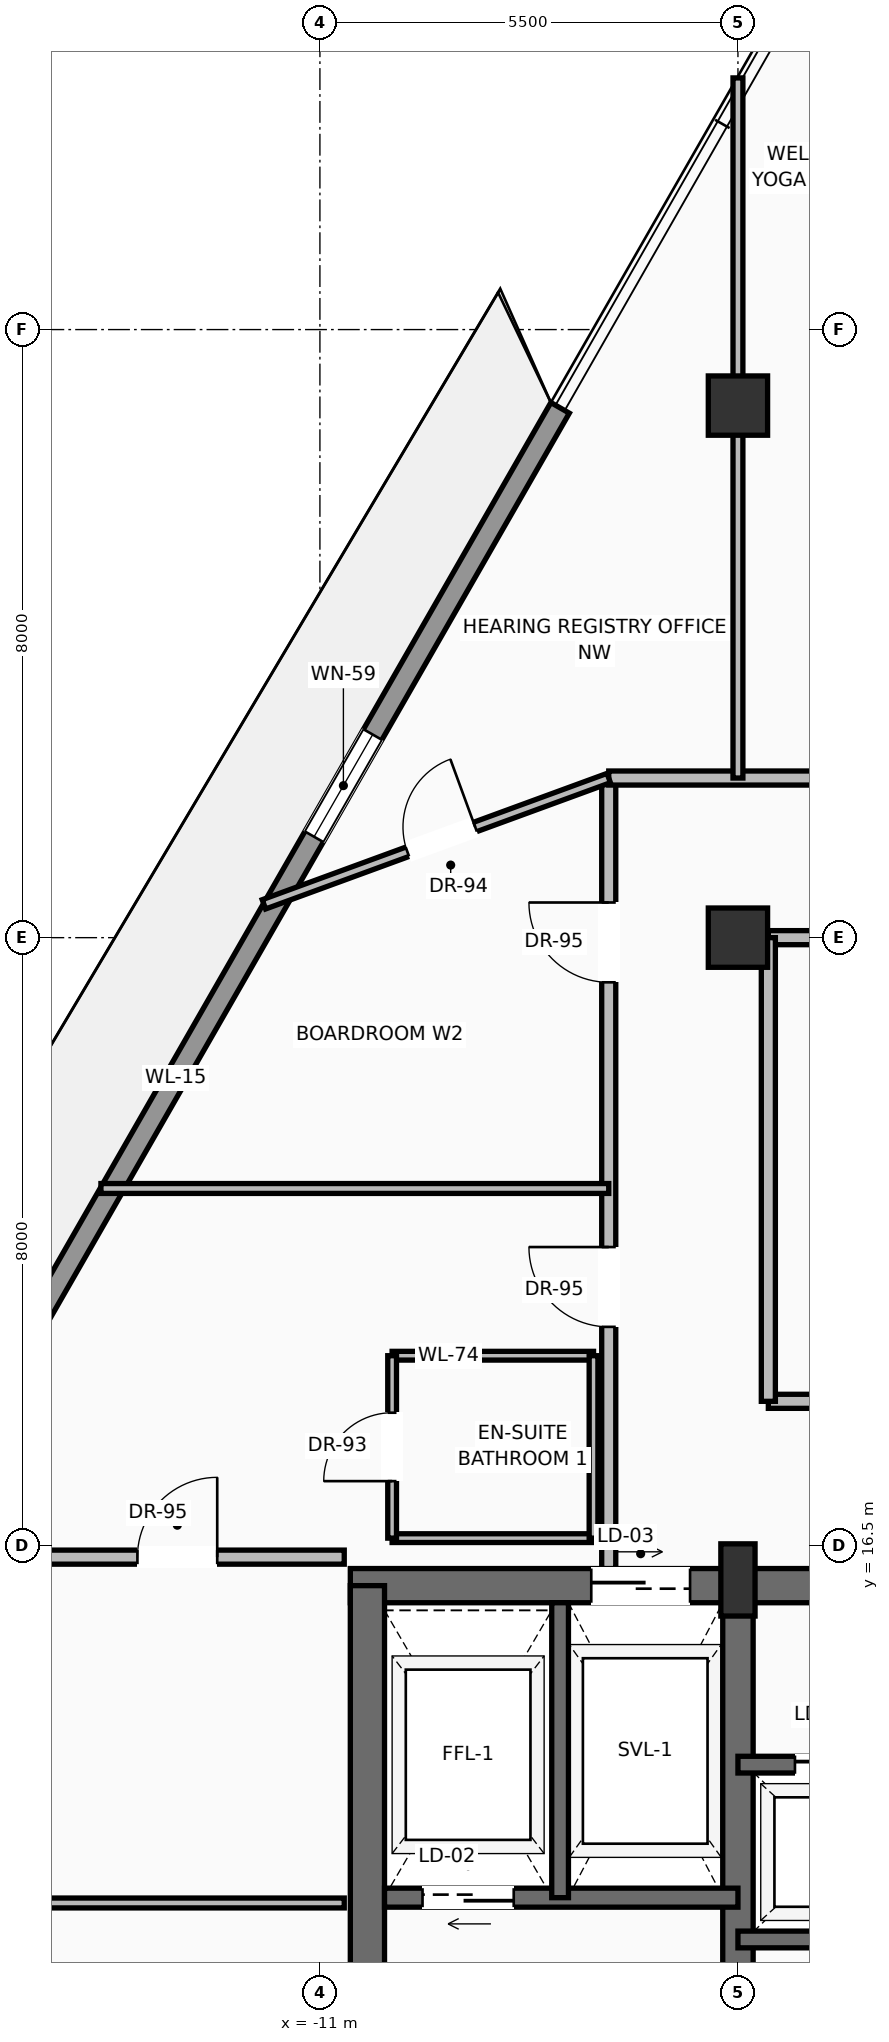
"""IFC4 building model, lengths in metres.
Left out: names, types, materials, properties, quantities, classifications, styles, units other than length and angle.
Written with IfcOpenShell. Run it as: python <this file> out.ifc"""

import sys

from ifc_helpers import new_model, si_unit, direction, frame, frame_2d, origin, origin_2d, place, context, subcontext, project, spatial, rectangle, extrude, source, transform, mapped, element, fill, save


model = new_model("IFC4")
c1 = context("Model", 3, precision=1e-05, world=origin(), true_north=direction((0.0, 1.0)))
c2 = subcontext(c1, "Body", "Model", "MODEL_VIEW")
j1 = project(units=[si_unit("LENGTHUNIT", "METRE"), si_unit("PLANEANGLEUNIT", "RADIAN")], contexts=[c1])
p1 = place(None, origin())
s1 = spatial("IfcSite", under=j1, at=p1, CompositionType="ELEMENT")
p2 = place(p1, origin())
s2 = spatial("IfcBuilding", under=s1, at=p2, CompositionType="ELEMENT")
p3 = place(p2, frame((0.0, 0.0, 293.7)))
s3 = spatial("IfcBuildingStorey", under=s2, at=p3, CompositionType="ELEMENT", Elevation=293.7)
p4 = place(p3, frame((-10.6, 15.975, 0.0), z_axis=(0.0, 0.0, 1.0), x_axis=(1.0, 0.0, 0.0)))
e1 = element("IfcWall", 1, at=p4, inside=s3, PredefinedType="SHEAR", context=c2, shape_type="SweptSolid", body=[
    extrude(rectangle(XDim=21.2, YDim=0.45, at=frame_2d((10.6, 0.0))), origin(), (0.0, 0.0, 1.0), 3.24),
])
p5 = place(p4, frame((3.17, 0.0, 0.0)))
e2 = element("IfcOpeningElement", 2, at=p5, cuts=e1, PredefinedType="OPENING", context=c2, shape_type="SweptSolid", body=[
    extrude(rectangle(XDim=1.3, YDim=2.3, at=frame_2d((0.65, 1.15))), frame((0.0, 0.235, 0.0), z_axis=(0.0, -1.0, 0.0), x_axis=(1.0, 0.0, 0.0)), (0.0, 0.0, 1.0), 0.47),
])
p6 = place(p4, frame((9.6, 0.0, 0.0)))
e3 = element("IfcOpeningElement", 3, at=p6, cuts=e1, PredefinedType="OPENING", context=c2, shape_type="SweptSolid", body=[
    extrude(rectangle(XDim=2.0, YDim=2.4, at=frame_2d((1.0, 1.2))), frame((0.0, 0.235, 0.0), z_axis=(0.0, -1.0, 0.0), x_axis=(1.0, 0.0, 0.0)), (0.0, 0.0, 1.0), 0.47),
])
p7 = place(p3, frame((-10.375, 0.625, 0.0), z_axis=(0.0, 0.0, 1.0), x_axis=(0.0, 1.0, 0.0)))
e4 = element("IfcWall", 4, at=p7, inside=s3, PredefinedType="SHEAR", context=c2, shape_type="SweptSolid", body=[
    extrude(rectangle(XDim=15.35, YDim=0.45, at=frame_2d((7.675, 0.0))), origin(), (0.0, 0.0, 1.0), 3.24),
])
p8 = place(p3, frame((-5.5, 0.625, 0.0), z_axis=(0.0, 0.0, 1.0), x_axis=(0.0, 1.0, 0.0)))
e5 = element("IfcWall", 5, at=p8, inside=s3, PredefinedType="SHEAR", context=c2, shape_type="SweptSolid", body=[
    extrude(rectangle(XDim=15.35, YDim=0.4, at=frame_2d((7.675, 0.0))), origin(), (0.0, 0.0, 1.0), 3.24),
])
p9 = place(p8, frame((8.875, 0.0, 0.0)))
e6 = element("IfcOpeningElement", 6, at=p9, cuts=e5, PredefinedType="OPENING", context=c2, shape_type="SweptSolid", body=[
    extrude(rectangle(XDim=1.1, YDim=2.2, at=frame_2d((0.55, 1.1))), frame((0.0, 0.21, 0.0), z_axis=(0.0, -1.0, 0.0), x_axis=(1.0, 0.0, 0.0)), (0.0, 0.0, 1.0), 0.42),
])
m1 = source(origin(), c2, "Body", "SweptSolid", [
    extrude(rectangle(XDim=0.45, YDim=0.95, at=origin_2d()), origin(), (0.0, 0.0, 1.0), 3.45),
])
p10 = place(p3, frame((-5.5, 16.05, 0.0), z_axis=(0.0, 0.0, 1.0), x_axis=(1.0, 0.0, 0.0)))
e7 = element("IfcColumn", 7, at=p10, inside=s3, PredefinedType="PILASTER", context=c2, shape_type="MappedRepresentation", body=[
    mapped(m1, transform((0.0, 0.0, 0.0), scale=1.0)),
])
m2 = source(origin(), c2, "Body", "SweptSolid", [
    extrude(rectangle(XDim=0.78, YDim=0.78, at=origin_2d()), origin(), (0.0, 0.0, 1.0), 3.45),
])
for number, where, z_axis, x_axis in (
    (8, (-5.5, 24.5, 0.0), (0.0, 0.0, 1.0), (1.0, 0.0, 0.0)),
    (9, (-5.5, 31.5, 0.0), (0.0, 0.0, 1.0), (1.0, 0.0, 0.0)),
):
    element("IfcColumn", number, at=place(p3, frame(where, z_axis=z_axis, x_axis=x_axis)), inside=s3, PredefinedType="COLUMN", context=c2, shape_type="MappedRepresentation", body=[
        mapped(m2, transform((0.0, 0.0, 0.0), scale=1.0)),
    ])
p11 = place(p3, frame((-17.955, 13.837, 0.0), z_axis=(0.0, 0.0, 1.0), x_axis=(0.49757006288, 0.867423790616, 0.0)))
e10 = element("IfcWall", 10, at=p11, inside=s3, PredefinedType="SOLIDWALL", context=c2, shape_type="SweptSolid", body=[
    extrude(rectangle(XDim=20.328, YDim=0.28, at=frame_2d((10.164, 0.0))), origin(), (0.0, 0.0, 1.0), 2.82),
])
p12 = place(p11, frame((4.879, 0.0, 0.0)))
e11 = element("IfcOpeningElement", 11, at=p12, cuts=e10, PredefinedType="OPENING", context=c2, shape_type="SweptSolid", body=[
    extrude(rectangle(XDim=1.6, YDim=2.35, at=frame_2d((0.8, 1.175))), frame((0.0, 0.15, 0.0), z_axis=(0.0, -1.0, 0.0), x_axis=(1.0, 0.0, 0.0)), (0.0, 0.0, 1.0), 0.3),
])
p13 = place(p11, frame((13.823, 0.0, 0.9)))
e12 = element("IfcOpeningElement", 12, at=p13, cuts=e10, PredefinedType="OPENING", context=c2, shape_type="SweptSolid", body=[
    extrude(rectangle(XDim=1.55, YDim=1.75, at=frame_2d((0.775, 0.875))), frame((0.0, 0.15, 0.0), z_axis=(0.0, -1.0, 0.0), x_axis=(1.0, 0.0, 0.0)), (0.0, 0.0, 1.0), 0.3),
])
p14 = place(p3, frame((-5.5, 11.87, 0.0), z_axis=(0.0, 0.0, 1.0), x_axis=(-1.0, 0.0, 0.0)))
e13 = element("IfcWall", 13, at=p14, inside=s3, PredefinedType="SOLIDWALL", context=c2, shape_type="SweptSolid", body=[
    extrude(rectangle(XDim=4.65, YDim=0.25, at=frame_2d((2.325, 0.0))), origin(), (0.0, 0.0, 1.0), 3.24),
])
p15 = place(p14, frame((2.95, 0.0, 0.0)))
e14 = element("IfcOpeningElement", 14, at=p15, cuts=e13, PredefinedType="OPENING", context=c2, shape_type="SweptSolid", body=[
    extrude(rectangle(XDim=1.2, YDim=2.25, at=frame_2d((0.6, 1.125))), frame((0.0, 0.135, 0.0), z_axis=(0.0, -1.0, 0.0), x_axis=(1.0, 0.0, 0.0)), (0.0, 0.0, 1.0), 0.27),
])
p16 = place(p3, frame((-7.84, 11.87, 0.0), z_axis=(0.0, 0.0, 1.0), x_axis=(0.0, 1.0, 0.0)))
e15 = element("IfcWall", 15, at=p16, inside=s3, PredefinedType="SOLIDWALL", context=c2, shape_type="SweptSolid", body=[
    extrude(rectangle(XDim=3.88, YDim=0.22, at=frame_2d((1.94, 0.0))), origin(), (0.0, 0.0, 1.0), 3.24),
])
p17 = place(p3, frame((-5.5, 11.32, 0.0), z_axis=(0.0, 0.0, 1.0), x_axis=(1.0, 0.0, 0.0)))
e16 = element("IfcWall", 16, at=p17, inside=s3, PredefinedType="SOLIDWALL", context=c2, shape_type="SweptSolid", body=[
    extrude(rectangle(XDim=7.32, YDim=0.22, at=frame_2d((3.66, 0.0))), origin(), (0.0, 0.0, 1.0), 3.24),
])
p18 = place(p3, frame((-5.5, 13.62, 0.0), z_axis=(0.0, 0.0, 1.0), x_axis=(1.0, 0.0, 0.0)))
e17 = element("IfcWall", 17, at=p18, inside=s3, PredefinedType="SOLIDWALL", context=c2, shape_type="SweptSolid", body=[
    extrude(rectangle(XDim=7.32, YDim=0.22, at=frame_2d((3.66, 0.0))), origin(), (0.0, 0.0, 1.0), 3.24),
])
p19 = place(p18, frame((0.75, 0.0, 0.0)))
e18 = element("IfcOpeningElement", 18, at=p19, cuts=e17, PredefinedType="OPENING", context=c2, shape_type="SweptSolid", body=[
    extrude(rectangle(XDim=1.1, YDim=2.2, at=frame_2d((0.55, 1.1))), frame((0.0, 0.12, 0.0), z_axis=(0.0, -1.0, 0.0), x_axis=(1.0, 0.0, 0.0)), (0.0, 0.0, 1.0), 0.24),
])
p20 = place(p18, frame((3.15, 0.0, 0.0)))
e19 = element("IfcOpeningElement", 19, at=p20, cuts=e17, PredefinedType="OPENING", context=c2, shape_type="SweptSolid", body=[
    extrude(rectangle(XDim=1.1, YDim=2.2, at=frame_2d((0.55, 1.1))), frame((0.0, 0.12, 0.0), z_axis=(0.0, -1.0, 0.0), x_axis=(1.0, 0.0, 0.0)), (0.0, 0.0, 1.0), 0.24),
])
p21 = place(p18, frame((5.55, 0.0, 0.0)))
e20 = element("IfcOpeningElement", 20, at=p21, cuts=e17, PredefinedType="OPENING", context=c2, shape_type="SweptSolid", body=[
    extrude(rectangle(XDim=1.1, YDim=2.2, at=frame_2d((0.55, 1.1))), frame((0.0, 0.12, 0.0), z_axis=(0.0, -1.0, 0.0), x_axis=(1.0, 0.0, 0.0)), (0.0, 0.0, 1.0), 0.24),
])
p22 = place(p3, frame((-5.1, 18.4, 0.0), z_axis=(0.0, 0.0, 1.0), x_axis=(1.0, 0.0, 0.0)))
e21 = element("IfcWall", 21, at=p22, inside=s3, PredefinedType="PARTITIONING", context=c2, shape_type="SweptSolid", body=[
    extrude(rectangle(XDim=10.2, YDim=0.185, at=frame_2d((5.1, 0.0))), origin(), (0.0, 0.0, 1.0), 3.232),
])
p23 = place(p22, frame((4.625, 0.0, 0.0)))
e22 = element("IfcOpeningElement", 22, at=p23, cuts=e21, PredefinedType="OPENING", context=c2, shape_type="SweptSolid", body=[
    extrude(rectangle(XDim=0.95, YDim=2.2, at=frame_2d((0.475, 1.1))), frame((0.0, 0.103, 0.0), z_axis=(0.0, -1.0, 0.0), x_axis=(1.0, 0.0, 0.0)), (0.0, 0.0, 1.0), 0.205),
])
p24 = place(p3, frame((-5.1, 24.5, 0.0), z_axis=(0.0, 0.0, 1.0), x_axis=(1.0, 0.0, 0.0)))
e23 = element("IfcWall", 23, at=p24, inside=s3, PredefinedType="PARTITIONING", context=c2, shape_type="SweptSolid", body=[
    extrude(rectangle(XDim=10.2, YDim=0.185, at=frame_2d((5.1, 0.0))), origin(), (0.0, 0.0, 1.0), 2.683),
])
p25 = place(p24, frame((4.625, 0.0, 0.0)))
e24 = element("IfcOpeningElement", 24, at=p25, cuts=e23, PredefinedType="OPENING", context=c2, shape_type="SweptSolid", body=[
    extrude(rectangle(XDim=0.95, YDim=2.2, at=frame_2d((0.475, 1.1))), frame((0.0, 0.103, 0.0), z_axis=(0.0, -1.0, 0.0), x_axis=(1.0, 0.0, 0.0)), (0.0, 0.0, 1.0), 0.205),
])
p26 = place(p3, frame((-5.1, 18.4, 0.0), z_axis=(0.0, 0.0, 1.0), x_axis=(0.0, 1.0, 0.0)))
e25 = element("IfcWall", 25, at=p26, inside=s3, PredefinedType="PARTITIONING", context=c2, shape_type="SweptSolid", body=[
    extrude(rectangle(XDim=6.1, YDim=0.185, at=frame_2d((3.05, 0.0))), origin(), (0.0, 0.0, 1.0), 3.232),
])
p27 = place(p3, frame((-7.2, 16.2, 0.0), z_axis=(0.0, 0.0, 1.0), x_axis=(0.0, 1.0, 0.0)))
e26 = element("IfcWall", 26, at=p27, inside=s3, PredefinedType="PARTITIONING", context=c2, shape_type="SweptSolid", body=[
    extrude(rectangle(XDim=10.4, YDim=0.185, at=frame_2d((5.2, 0.0))), origin(), (0.0, 0.0, 1.0), 3.232),
])
p28 = place(p27, frame((3.18, 0.0, 0.0)))
e27 = element("IfcOpeningElement", 27, at=p28, cuts=e26, PredefinedType="OPENING", context=c2, shape_type="SweptSolid", body=[
    extrude(rectangle(XDim=1.05, YDim=2.25, at=frame_2d((0.525, 1.125))), frame((0.0, 0.103, 0.0), z_axis=(0.0, -1.0, 0.0), x_axis=(1.0, 0.0, 0.0)), (0.0, 0.0, 1.0), 0.205),
])
p29 = place(p27, frame((7.712, 0.0, 0.0)))
e28 = element("IfcOpeningElement", 28, at=p29, cuts=e26, PredefinedType="OPENING", context=c2, shape_type="SweptSolid", body=[
    extrude(rectangle(XDim=1.05, YDim=2.25, at=frame_2d((0.525, 1.125))), frame((0.0, 0.103, 0.0), z_axis=(0.0, -1.0, 0.0), x_axis=(1.0, 0.0, 0.0)), (0.0, 0.0, 1.0), 0.205),
])
p30 = place(p3, frame((-7.2, 26.6, 0.0), z_axis=(0.0, 0.0, 1.0), x_axis=(1.0, 0.0, 0.0)))
e29 = element("IfcWall", 29, at=p30, inside=s3, PredefinedType="PARTITIONING", context=c2, shape_type="SweptSolid", body=[
    extrude(rectangle(XDim=14.4, YDim=0.185, at=frame_2d((7.2, 0.0))), origin(), (0.0, 0.0, 1.0), 3.232),
])
p31 = place(p30, frame((4.698, 0.0, 0.0)))
e30 = element("IfcOpeningElement", 30, at=p31, cuts=e29, PredefinedType="OPENING", context=c2, shape_type="SweptSolid", body=[
    extrude(rectangle(XDim=1.05, YDim=2.25, at=frame_2d((0.525, 1.125))), frame((0.0, 0.103, 0.0), z_axis=(0.0, -1.0, 0.0), x_axis=(1.0, 0.0, 0.0)), (0.0, 0.0, 1.0), 0.205),
])
p32 = place(p30, frame((6.675, 0.0, 0.0)))
e31 = element("IfcOpeningElement", 31, at=p32, cuts=e29, PredefinedType="OPENING", context=c2, shape_type="SweptSolid", body=[
    extrude(rectangle(XDim=1.05, YDim=2.25, at=frame_2d((0.525, 1.125))), frame((0.0, 0.103, 0.0), z_axis=(0.0, -1.0, 0.0), x_axis=(1.0, 0.0, 0.0)), (0.0, 0.0, 1.0), 0.205),
])
p33 = place(p30, frame((8.653, 0.0, 0.0)))
e32 = element("IfcOpeningElement", 32, at=p33, cuts=e29, PredefinedType="OPENING", context=c2, shape_type="SweptSolid", body=[
    extrude(rectangle(XDim=1.05, YDim=2.25, at=frame_2d((0.525, 1.125))), frame((0.0, 0.103, 0.0), z_axis=(0.0, -1.0, 0.0), x_axis=(1.0, 0.0, 0.0)), (0.0, 0.0, 1.0), 0.205),
])
p34 = place(p3, frame((-16.663, 16.35, 0.0), z_axis=(0.0, 0.0, 1.0), x_axis=(1.0, 0.0, 0.0)))
e33 = element("IfcWall", 33, at=p34, inside=s3, PredefinedType="PARTITIONING", context=c2, shape_type="SweptSolid", body=[
    extrude(rectangle(XDim=5.983, YDim=0.185, at=frame_2d((2.992, 0.0))), origin(), (0.0, 0.0, 1.0), 3.232),
])
p35 = place(p34, frame((3.262, 0.0, 0.0)))
e34 = element("IfcOpeningElement", 34, at=p35, cuts=e33, PredefinedType="OPENING", context=c2, shape_type="SweptSolid", body=[
    extrude(rectangle(XDim=1.05, YDim=2.25, at=frame_2d((0.525, 1.125))), frame((0.0, 0.103, 0.0), z_axis=(0.0, -1.0, 0.0), x_axis=(1.0, 0.0, 0.0)), (0.0, 0.0, 1.0), 0.205),
])
p36 = place(p3, frame((-11.737, 24.938, 0.0), z_axis=(0.0, 0.0, 1.0), x_axis=(0.938986778796, 0.343953237005, 0.0)))
e35 = element("IfcWall", 35, at=p36, inside=s3, PredefinedType="PARTITIONING", context=c2, shape_type="SweptSolid", body=[
    extrude(rectangle(XDim=4.832, YDim=0.13, at=frame_2d((2.416, 0.0))), origin(), (0.0, 0.0, 1.0), 3.232),
])
p37 = place(p36, frame((2.01, 0.0, 0.0)))
e36 = element("IfcOpeningElement", 36, at=p37, cuts=e35, PredefinedType="OPENING", context=c2, shape_type="SweptSolid", body=[
    extrude(rectangle(XDim=0.95, YDim=2.2, at=frame_2d((0.475, 1.1))), frame((0.0, 0.075, 0.0), z_axis=(0.0, -1.0, 0.0), x_axis=(1.0, 0.0, 0.0)), (0.0, 0.0, 1.0), 0.15),
])
p38 = place(p3, frame((-5.5, 26.6, 0.0), z_axis=(0.0, 0.0, 1.0), x_axis=(0.0, 1.0, 0.0)))
e37 = element("IfcWall", 37, at=p38, inside=s3, PredefinedType="PARTITIONING", context=c2, shape_type="SweptSolid", body=[
    extrude(rectangle(XDim=9.211, YDim=0.13, at=frame_2d((4.605, 0.0))), origin(), (0.0, 0.0, 1.0), 2.683),
])
p39 = place(p3, frame((-19.273, 11.8, 0.0), z_axis=(0.0, 0.0, 1.0), x_axis=(1.0, 0.0, 0.0)))
e38 = element("IfcWall", 38, at=p39, inside=s3, PredefinedType="PARTITIONING", context=c2, shape_type="SweptSolid", body=[
    extrude(rectangle(XDim=8.593, YDim=0.13, at=frame_2d((4.297, 0.0))), origin(), (0.0, 0.0, 1.0), 3.232),
])
p40 = place(p39, frame((3.426, 0.0, 0.0)))
e39 = element("IfcOpeningElement", 39, at=p40, cuts=e38, PredefinedType="OPENING", context=c2, shape_type="SweptSolid", body=[
    extrude(rectangle(XDim=0.95, YDim=2.2, at=frame_2d((0.475, 1.1))), frame((0.0, 0.075, 0.0), z_axis=(0.0, -1.0, 0.0), x_axis=(1.0, 0.0, 0.0)), (0.0, 0.0, 1.0), 0.15),
])
for number, where, z_axis, x_axis in (
    (40, (-10.05, 16.6, 0.0), (0.0, 0.0, 1.0), (1.0, 0.0, 0.0)),
    (41, (-10.05, 19.0, 0.0), (0.0, 0.0, 1.0), (1.0, 0.0, 0.0)),
):
    element("IfcWall", number, at=place(p3, frame(where, z_axis=z_axis, x_axis=x_axis)), inside=s3, PredefinedType="PARTITIONING", context=c2, shape_type="SweptSolid", body=[
        extrude(rectangle(XDim=2.65, YDim=0.115, at=frame_2d((1.325, 0.0))), origin(), (0.0, 0.0, 1.0), 3.232),
    ])
p41 = place(p3, frame((-10.05, 16.6, 0.0), z_axis=(0.0, 0.0, 1.0), x_axis=(0.0, 1.0, 0.0)))
e42 = element("IfcWall", 42, at=p41, inside=s3, PredefinedType="PARTITIONING", context=c2, shape_type="SweptSolid", body=[
    extrude(rectangle(XDim=2.4, YDim=0.115, at=frame_2d((1.2, 0.0))), origin(), (0.0, 0.0, 1.0), 3.232),
])
p42 = place(p41, frame((0.75, 0.0, 0.0)))
e43 = element("IfcOpeningElement", 43, at=p42, cuts=e42, PredefinedType="OPENING", context=c2, shape_type="SweptSolid", body=[
    extrude(rectangle(XDim=0.9, YDim=2.15, at=frame_2d((0.45, 1.075))), frame((0.0, 0.067, 0.0), z_axis=(0.0, -1.0, 0.0), x_axis=(1.0, 0.0, 0.0)), (0.0, 0.0, 1.0), 0.135),
])
p43 = place(p3, frame((-7.4, 16.6, 0.0), z_axis=(0.0, 0.0, 1.0), x_axis=(0.0, 1.0, 0.0)))
e44 = element("IfcWall", 44, at=p43, inside=s3, PredefinedType="PARTITIONING", context=c2, shape_type="SweptSolid", body=[
    extrude(rectangle(XDim=2.4, YDim=0.115, at=frame_2d((1.2, 0.0))), origin(), (0.0, 0.0, 1.0), 3.232),
])
p44 = place(p3, frame((-13.881, 21.2, 0.0), z_axis=(0.0, 0.0, 1.0), x_axis=(1.0, 0.0, 0.0)))
e45 = element("IfcWall", 45, at=p44, inside=s3, PredefinedType="PARTITIONING", context=c2, shape_type="SweptSolid", body=[
    extrude(rectangle(XDim=6.681, YDim=0.13, at=frame_2d((3.341, 0.0))), origin(), (0.0, 0.0, 1.0), 3.232),
])
m3 = source(origin(), c2, "Body", "SweptSolid", [
    extrude(rectangle(XDim=1.55, YDim=1.75, at=frame_2d((0.775, 0.875))), frame((0.0, 0.03, 0.0), z_axis=(0.0, -1.0, 0.0), x_axis=(1.0, 0.0, 0.0)), (0.0, 0.0, 1.0), 0.06),
])
p45 = place(p13, origin())
e46 = element("IfcWindow", 46, at=p45, inside=s3, PartitioningType="SINGLE_PANEL", PredefinedType="WINDOW", context=c2, shape_type="MappedRepresentation", body=[
    mapped(m3, transform((0.0, 0.0, 0.0), scale=1.0)),
])
fill(e12, e46)
m4 = source(origin(), c2, "Body", "SweptSolid", [
    extrude(rectangle(XDim=1.2, YDim=2.25, at=frame_2d((0.6, 1.125))), frame((0.0, 0.025, 0.0), z_axis=(0.0, -1.0, 0.0), x_axis=(1.0, 0.0, 0.0)), (0.0, 0.0, 1.0), 0.05),
])
p46 = place(p15, origin())
e47 = element("IfcDoor", 47, at=p46, inside=s3, OperationType="SLIDING_TO_LEFT", PredefinedType="DOOR", context=c2, shape_type="MappedRepresentation", body=[
    mapped(m4, transform((0.0, 0.0, 0.0), scale=1.0)),
])
fill(e14, e47)
m5 = source(origin(), c2, "Body", "SweptSolid", [
    extrude(rectangle(XDim=1.3, YDim=2.3, at=frame_2d((0.65, 1.15))), frame((0.0, 0.025, 0.0), z_axis=(0.0, -1.0, 0.0), x_axis=(1.0, 0.0, 0.0)), (0.0, 0.0, 1.0), 0.05),
])
p47 = place(p5, origin())
e48 = element("IfcDoor", 48, at=p47, inside=s3, OperationType="SLIDING_TO_RIGHT", PredefinedType="DOOR", context=c2, shape_type="MappedRepresentation", body=[
    mapped(m5, transform((0.0, 0.0, 0.0), scale=1.0)),
])
fill(e2, e48)
m6 = source(origin(), c2, "Body", "SweptSolid", [
    extrude(rectangle(XDim=1.1, YDim=2.2, at=frame_2d((0.55, 1.1))), frame((0.0, 0.025, 0.0), z_axis=(0.0, -1.0, 0.0), x_axis=(1.0, 0.0, 0.0)), (0.0, 0.0, 1.0), 0.05),
])
p48 = place(p19, origin())
e49 = element("IfcDoor", 49, at=p48, inside=s3, OperationType="SLIDING_TO_RIGHT", PredefinedType="DOOR", context=c2, shape_type="MappedRepresentation", body=[
    mapped(m6, transform((0.0, 0.0, 0.0), scale=1.0)),
])
fill(e18, e49)
m7 = source(origin(), c2, "Body", "SweptSolid", [
    extrude(rectangle(XDim=1.05, YDim=2.25, at=frame_2d((0.525, 1.125))), frame((0.0, 0.025, 0.0), z_axis=(0.0, -1.0, 0.0), x_axis=(1.0, 0.0, 0.0)), (0.0, 0.0, 1.0), 0.05),
])
p49 = place(p35, origin())
e50 = element("IfcDoor", 50, at=p49, inside=s3, OperationType="SINGLE_SWING_RIGHT", PredefinedType="DOOR", context=c2, shape_type="MappedRepresentation", body=[
    mapped(m7, transform((0.0, 0.0, 0.0), scale=1.0)),
])
fill(e34, e50)
p50 = place(p28, origin())
e51 = element("IfcDoor", 51, at=p50, inside=s3, OperationType="SINGLE_SWING_RIGHT", PredefinedType="DOOR", context=c2, shape_type="MappedRepresentation", body=[
    mapped(m7, transform((0.0, 0.0, 0.0), scale=1.0)),
])
fill(e27, e51)
m8 = source(origin(), c2, "Body", "SweptSolid", [
    extrude(rectangle(XDim=0.9, YDim=2.15, at=frame_2d((0.45, 1.075))), frame((0.0, 0.025, 0.0), z_axis=(0.0, -1.0, 0.0), x_axis=(1.0, 0.0, 0.0)), (0.0, 0.0, 1.0), 0.05),
])
p51 = place(p42, origin())
e52 = element("IfcDoor", 52, at=p51, inside=s3, OperationType="SINGLE_SWING_LEFT", PredefinedType="DOOR", context=c2, shape_type="MappedRepresentation", body=[
    mapped(m8, transform((0.0, 0.0, 0.0), scale=1.0)),
])
fill(e43, e52)
p52 = place(p29, origin())
e53 = element("IfcDoor", 53, at=p52, inside=s3, OperationType="SINGLE_SWING_RIGHT", PredefinedType="DOOR", context=c2, shape_type="MappedRepresentation", body=[
    mapped(m7, transform((0.0, 0.0, 0.0), scale=1.0)),
])
fill(e28, e53)
m9 = source(origin(), c2, "Body", "SweptSolid", [
    extrude(rectangle(XDim=0.95, YDim=2.2, at=frame_2d((0.475, 1.1))), frame((0.0, 0.025, 0.0), z_axis=(0.0, -1.0, 0.0), x_axis=(1.0, 0.0, 0.0)), (0.0, 0.0, 1.0), 0.05),
])
p53 = place(p37, origin())
e54 = element("IfcDoor", 54, at=p53, inside=s3, OperationType="SINGLE_SWING_RIGHT", PredefinedType="DOOR", context=c2, shape_type="MappedRepresentation", body=[
    mapped(m9, transform((0.0, 0.0, 0.0), scale=1.0)),
])
fill(e36, e54)
save(model, sys.argv[1])
